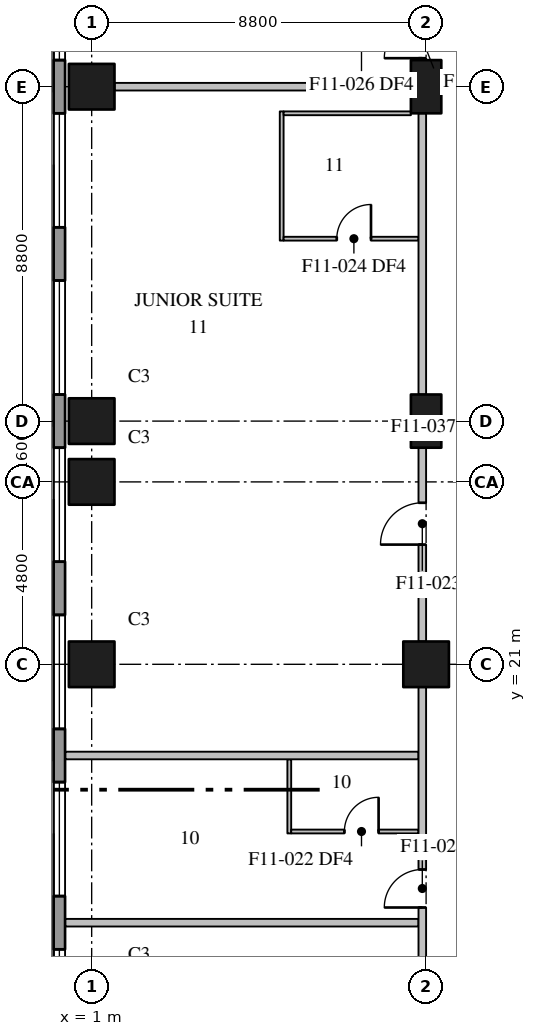
"""IFC4 building model, lengths in metres.
Left out: names, types, materials, properties, quantities, classifications, styles, units other than length and angle.
Written with IfcOpenShell. Run it as: python <this file> out.ifc"""

import sys

from ifc_helpers import new_model, si_unit, direction, frame, frame_2d, origin, origin_2d, place, context, subcontext, project, spatial, rectangle, extrude, element, fill, save


model = new_model("IFC4")
c1 = context("Model", 3, precision=1e-05, world=origin(), true_north=direction((0.0, 1.0)))
c2 = subcontext(c1, "Body", "Model", "MODEL_VIEW")
j1 = project(units=[si_unit("LENGTHUNIT", "METRE"), si_unit("PLANEANGLEUNIT", "RADIAN")], contexts=[c1])
p1 = place(None, origin())
s1 = spatial("IfcSite", under=j1, at=p1, CompositionType="ELEMENT")
p2 = place(p1, origin())
s2 = spatial("IfcBuilding", under=s1, at=p2, CompositionType="ELEMENT")
p3 = place(p2, frame((0.0, 0.0, 111.1)))
s3 = spatial("IfcBuildingStorey", under=s2, at=p3, CompositionType="ELEMENT", Elevation=111.1)
for number, where, z_axis, x_axis in (
    (1, (1.0, 21.0, 0.0), (0.0, 0.0, 1.0), (1.0, 0.0, 0.0)),
    (2, (1.0, 25.8, 0.0), (0.0, 0.0, 1.0), (1.0, 0.0, 0.0)),
    (3, (1.0, 27.4, 0.0), (0.0, 0.0, 1.0), (1.0, 0.0, 0.0)),
    (4, (1.0, 36.2, 0.0), (0.0, 0.0, 1.0), (1.0, 0.0, 0.0)),
    (5, (9.8, 21.0, 0.0), (0.0, 0.0, 1.0), (1.0, 0.0, 0.0)),
):
    element("IfcColumn", number, at=place(p3, frame(where, z_axis=z_axis, x_axis=x_axis)), inside=s3, PredefinedType="COLUMN", context=c2, shape_type="SweptSolid", body=[
        extrude(rectangle(XDim=1.2, YDim=1.2, at=origin_2d()), origin(), (0.0, 0.0, 1.0), 3.7),
    ])
for number, where, z_axis, x_axis in (
    (6, (9.8, 27.4, 0.0), (0.0, 0.0, 1.0), (0.0, 1.0, 0.0)),
    (7, (9.8, 36.2, 0.0), (0.0, 0.0, 1.0), (0.0, 1.0, 0.0)),
):
    element("IfcColumn", number, at=place(p3, frame(where, z_axis=z_axis, x_axis=x_axis)), inside=s3, PredefinedType="COLUMN", context=c2, shape_type="SweptSolid", body=[
        extrude(rectangle(XDim=1.4, YDim=0.8, at=origin_2d()), origin(), (0.0, 0.0, 1.0), 3.7),
    ])
p4 = place(p3, frame((0.15, 78.7, 0.0), z_axis=(0.0, 0.0, 1.0), x_axis=(0.0, -1.0, 0.0)))
e8 = element("IfcWall", 8, at=p4, inside=s3, PredefinedType="STANDARD", context=c2, shape_type="SweptSolid", body=[
    extrude(rectangle(XDim=76.5, YDim=0.3, at=frame_2d((38.25, 0.0))), origin(), (0.0, 0.0, 1.0), 3.4),
])
p5 = place(p4, frame((3.6, 0.0, 0.75)))
e9 = element("IfcOpeningElement", 9, at=p5, cuts=e8, PredefinedType="OPENING", context=c2, shape_type="SweptSolid", body=[
    extrude(rectangle(XDim=3.0, YDim=2.3, at=frame_2d((1.5, 1.15))), frame((0.0, 0.16, 0.0), z_axis=(0.0, -1.0, 0.0), x_axis=(1.0, 0.0, 0.0)), (0.0, 0.0, 1.0), 0.32),
])
p6 = place(p4, frame((8.0, 0.0, 0.75)))
e10 = element("IfcOpeningElement", 10, at=p6, cuts=e8, PredefinedType="OPENING", context=c2, shape_type="SweptSolid", body=[
    extrude(rectangle(XDim=3.0, YDim=2.3, at=frame_2d((1.5, 1.15))), frame((0.0, 0.16, 0.0), z_axis=(0.0, -1.0, 0.0), x_axis=(1.0, 0.0, 0.0)), (0.0, 0.0, 1.0), 0.32),
])
p7 = place(p4, frame((12.4, 0.0, 0.75)))
e11 = element("IfcOpeningElement", 11, at=p7, cuts=e8, PredefinedType="OPENING", context=c2, shape_type="SweptSolid", body=[
    extrude(rectangle(XDim=3.0, YDim=2.3, at=frame_2d((1.5, 1.15))), frame((0.0, 0.16, 0.0), z_axis=(0.0, -1.0, 0.0), x_axis=(1.0, 0.0, 0.0)), (0.0, 0.0, 1.0), 0.32),
])
p8 = place(p4, frame((16.8, 0.0, 0.75)))
e12 = element("IfcOpeningElement", 12, at=p8, cuts=e8, PredefinedType="OPENING", context=c2, shape_type="SweptSolid", body=[
    extrude(rectangle(XDim=3.0, YDim=2.3, at=frame_2d((1.5, 1.15))), frame((0.0, 0.16, 0.0), z_axis=(0.0, -1.0, 0.0), x_axis=(1.0, 0.0, 0.0)), (0.0, 0.0, 1.0), 0.32),
])
p9 = place(p4, frame((21.2, 0.0, 0.75)))
e13 = element("IfcOpeningElement", 13, at=p9, cuts=e8, PredefinedType="OPENING", context=c2, shape_type="SweptSolid", body=[
    extrude(rectangle(XDim=3.0, YDim=2.3, at=frame_2d((1.5, 1.15))), frame((0.0, 0.16, 0.0), z_axis=(0.0, -1.0, 0.0), x_axis=(1.0, 0.0, 0.0)), (0.0, 0.0, 1.0), 0.32),
])
p10 = place(p4, frame((25.6, 0.0, 0.75)))
e14 = element("IfcOpeningElement", 14, at=p10, cuts=e8, PredefinedType="OPENING", context=c2, shape_type="SweptSolid", body=[
    extrude(rectangle(XDim=3.0, YDim=2.3, at=frame_2d((1.5, 1.15))), frame((0.0, 0.16, 0.0), z_axis=(0.0, -1.0, 0.0), x_axis=(1.0, 0.0, 0.0)), (0.0, 0.0, 1.0), 0.32),
])
p11 = place(p4, frame((30.0, 0.0, 0.75)))
e15 = element("IfcOpeningElement", 15, at=p11, cuts=e8, PredefinedType="OPENING", context=c2, shape_type="SweptSolid", body=[
    extrude(rectangle(XDim=3.0, YDim=2.3, at=frame_2d((1.5, 1.15))), frame((0.0, 0.16, 0.0), z_axis=(0.0, -1.0, 0.0), x_axis=(1.0, 0.0, 0.0)), (0.0, 0.0, 1.0), 0.32),
])
p12 = place(p4, frame((34.4, 0.0, 0.75)))
e16 = element("IfcOpeningElement", 16, at=p12, cuts=e8, PredefinedType="OPENING", context=c2, shape_type="SweptSolid", body=[
    extrude(rectangle(XDim=3.0, YDim=2.3, at=frame_2d((1.5, 1.15))), frame((0.0, 0.16, 0.0), z_axis=(0.0, -1.0, 0.0), x_axis=(1.0, 0.0, 0.0)), (0.0, 0.0, 1.0), 0.32),
])
p13 = place(p4, frame((38.8, 0.0, 0.75)))
e17 = element("IfcOpeningElement", 17, at=p13, cuts=e8, PredefinedType="OPENING", context=c2, shape_type="SweptSolid", body=[
    extrude(rectangle(XDim=3.0, YDim=2.3, at=frame_2d((1.5, 1.15))), frame((0.0, 0.16, 0.0), z_axis=(0.0, -1.0, 0.0), x_axis=(1.0, 0.0, 0.0)), (0.0, 0.0, 1.0), 0.32),
])
p14 = place(p4, frame((43.2, 0.0, 0.75)))
e18 = element("IfcOpeningElement", 18, at=p14, cuts=e8, PredefinedType="OPENING", context=c2, shape_type="SweptSolid", body=[
    extrude(rectangle(XDim=3.0, YDim=2.3, at=frame_2d((1.5, 1.15))), frame((0.0, 0.16, 0.0), z_axis=(0.0, -1.0, 0.0), x_axis=(1.0, 0.0, 0.0)), (0.0, 0.0, 1.0), 0.32),
])
p15 = place(p4, frame((47.6, 0.0, 0.75)))
e19 = element("IfcOpeningElement", 19, at=p15, cuts=e8, PredefinedType="OPENING", context=c2, shape_type="SweptSolid", body=[
    extrude(rectangle(XDim=3.0, YDim=2.3, at=frame_2d((1.5, 1.15))), frame((0.0, 0.16, 0.0), z_axis=(0.0, -1.0, 0.0), x_axis=(1.0, 0.0, 0.0)), (0.0, 0.0, 1.0), 0.32),
])
p16 = place(p4, frame((52.0, 0.0, 0.75)))
e20 = element("IfcOpeningElement", 20, at=p16, cuts=e8, PredefinedType="OPENING", context=c2, shape_type="SweptSolid", body=[
    extrude(rectangle(XDim=3.0, YDim=2.3, at=frame_2d((1.5, 1.15))), frame((0.0, 0.16, 0.0), z_axis=(0.0, -1.0, 0.0), x_axis=(1.0, 0.0, 0.0)), (0.0, 0.0, 1.0), 0.32),
])
p17 = place(p4, frame((56.4, 0.0, 0.75)))
e21 = element("IfcOpeningElement", 21, at=p17, cuts=e8, PredefinedType="OPENING", context=c2, shape_type="SweptSolid", body=[
    extrude(rectangle(XDim=3.0, YDim=2.3, at=frame_2d((1.5, 1.15))), frame((0.0, 0.16, 0.0), z_axis=(0.0, -1.0, 0.0), x_axis=(1.0, 0.0, 0.0)), (0.0, 0.0, 1.0), 0.32),
])
p18 = place(p4, frame((60.8, 0.0, 0.75)))
e22 = element("IfcOpeningElement", 22, at=p18, cuts=e8, PredefinedType="OPENING", context=c2, shape_type="SweptSolid", body=[
    extrude(rectangle(XDim=3.0, YDim=2.3, at=frame_2d((1.5, 1.15))), frame((0.0, 0.16, 0.0), z_axis=(0.0, -1.0, 0.0), x_axis=(1.0, 0.0, 0.0)), (0.0, 0.0, 1.0), 0.32),
])
p19 = place(p4, frame((65.2, 0.0, 0.75)))
e23 = element("IfcOpeningElement", 23, at=p19, cuts=e8, PredefinedType="OPENING", context=c2, shape_type="SweptSolid", body=[
    extrude(rectangle(XDim=3.0, YDim=2.3, at=frame_2d((1.5, 1.15))), frame((0.0, 0.16, 0.0), z_axis=(0.0, -1.0, 0.0), x_axis=(1.0, 0.0, 0.0)), (0.0, 0.0, 1.0), 0.32),
])
p20 = place(p4, frame((69.6, 0.0, 0.75)))
e24 = element("IfcOpeningElement", 24, at=p20, cuts=e8, PredefinedType="OPENING", context=c2, shape_type="SweptSolid", body=[
    extrude(rectangle(XDim=3.0, YDim=2.3, at=frame_2d((1.5, 1.15))), frame((0.0, 0.16, 0.0), z_axis=(0.0, -1.0, 0.0), x_axis=(1.0, 0.0, 0.0)), (0.0, 0.0, 1.0), 0.32),
])
p21 = place(p3, frame((9.7, 12.9, 0.0), z_axis=(0.0, 0.0, 1.0), x_axis=(0.0, 1.0, 0.0)))
e25 = element("IfcWall", 25, at=p21, inside=s3, PredefinedType="PARTITIONING", context=c2, shape_type="SweptSolid", body=[
    extrude(rectangle(XDim=7.5, YDim=0.2, at=frame_2d((3.75, 0.0))), origin(), (0.0, 0.0, 1.0), 3.4),
])
p22 = place(p21, frame((1.7, 0.0, 0.0)))
e26 = element("IfcOpeningElement", 26, at=p22, cuts=e25, PredefinedType="OPENING", context=c2, shape_type="SweptSolid", body=[
    extrude(rectangle(XDim=1.0, YDim=2.1, at=frame_2d((0.5, 1.05))), frame((0.0, 0.11, 0.0), z_axis=(0.0, -1.0, 0.0), x_axis=(1.0, 0.0, 0.0)), (0.0, 0.0, 1.0), 0.22),
])
p23 = place(p3, frame((9.7, 21.6, 0.0), z_axis=(0.0, 0.0, 1.0), x_axis=(0.0, 1.0, 0.0)))
e27 = element("IfcWall", 27, at=p23, inside=s3, PredefinedType="PARTITIONING", context=c2, shape_type="SweptSolid", body=[
    extrude(rectangle(XDim=5.1, YDim=0.2, at=frame_2d((2.55, 0.0))), origin(), (0.0, 0.0, 1.0), 3.4),
])
p24 = place(p23, frame((2.55, 0.0, 0.0)))
e28 = element("IfcOpeningElement", 28, at=p24, cuts=e27, PredefinedType="OPENING", context=c2, shape_type="SweptSolid", body=[
    extrude(rectangle(XDim=1.1, YDim=2.1, at=frame_2d((0.55, 1.05))), frame((0.0, 0.11, 0.0), z_axis=(0.0, -1.0, 0.0), x_axis=(1.0, 0.0, 0.0)), (0.0, 0.0, 1.0), 0.22),
])
p25 = place(p3, frame((9.7, 28.1, 0.0), z_axis=(0.0, 0.0, 1.0), x_axis=(0.0, 1.0, 0.0)))
e29 = element("IfcWall", 29, at=p25, inside=s3, PredefinedType="PARTITIONING", context=c2, shape_type="SweptSolid", body=[
    extrude(rectangle(XDim=7.4, YDim=0.2, at=frame_2d((3.7, 0.0))), origin(), (0.0, 0.0, 1.0), 3.4),
])
p26 = place(p3, frame((9.7, 36.9, 0.0), z_axis=(0.0, 0.0, 1.0), x_axis=(0.0, 1.0, 0.0)))
e30 = element("IfcWall", 30, at=p26, inside=s3, PredefinedType="PARTITIONING", context=c2, shape_type="SweptSolid", body=[
    extrude(rectangle(XDim=7.4, YDim=0.2, at=frame_2d((3.7, 0.0))), origin(), (0.0, 0.0, 1.0), 3.4),
])
p27 = place(p26, frame((0.05, 0.0, 0.0)))
e31 = element("IfcOpeningElement", 31, at=p27, cuts=e30, PredefinedType="OPENING", context=c2, shape_type="SweptSolid", body=[
    extrude(rectangle(XDim=1.0, YDim=2.1, at=frame_2d((0.5, 1.05))), frame((0.0, 0.11, 0.0), z_axis=(0.0, -1.0, 0.0), x_axis=(1.0, 0.0, 0.0)), (0.0, 0.0, 1.0), 0.22),
])
for number, where, z_axis, x_axis in (
    (32, (0.31, 14.2, 0.0), (0.0, 0.0, 1.0), (1.0, 0.0, 0.0)),
    (33, (0.31, 18.6, 0.0), (0.0, 0.0, 1.0), (1.0, 0.0, 0.0)),
):
    element("IfcWall", number, at=place(p3, frame(where, z_axis=z_axis, x_axis=x_axis)), inside=s3, PredefinedType="PARTITIONING", context=c2, shape_type="SweptSolid", body=[
        extrude(rectangle(XDim=9.29, YDim=0.2, at=frame_2d((4.645, 0.0))), origin(), (0.0, 0.0, 1.0), 3.4),
    ])
p28 = place(p3, frame((1.6, 36.2, 0.0), z_axis=(0.0, 0.0, 1.0), x_axis=(1.0, 0.0, 0.0)))
e34 = element("IfcWall", 34, at=p28, inside=s3, PredefinedType="PARTITIONING", context=c2, shape_type="SweptSolid", body=[
    extrude(rectangle(XDim=7.8, YDim=0.2, at=frame_2d((3.9, 0.0))), origin(), (0.0, 0.0, 1.0), 3.4),
])
p29 = place(p3, frame((6.2, 16.55, 0.0), z_axis=(0.0, 0.0, 1.0), x_axis=(0.0, 1.0, 0.0)))
e35 = element("IfcWall", 35, at=p29, inside=s3, PredefinedType="PARTITIONING", context=c2, shape_type="SweptSolid", body=[
    extrude(rectangle(XDim=1.95, YDim=0.1, at=frame_2d((0.975, 0.0))), origin(), (0.0, 0.0, 1.0), 3.4),
])
p30 = place(p3, frame((6.25, 16.6, 0.0), z_axis=(0.0, 0.0, 1.0), x_axis=(1.0, 0.0, 0.0)))
e36 = element("IfcWall", 36, at=p30, inside=s3, PredefinedType="PARTITIONING", context=c2, shape_type="SweptSolid", body=[
    extrude(rectangle(XDim=3.35, YDim=0.1, at=frame_2d((1.675, 0.0))), origin(), (0.0, 0.0, 1.0), 3.4),
])
p31 = place(p30, frame((1.4, 0.0, 0.0)))
e37 = element("IfcOpeningElement", 37, at=p31, cuts=e36, PredefinedType="OPENING", context=c2, shape_type="SweptSolid", body=[
    extrude(rectangle(XDim=0.9, YDim=2.1, at=frame_2d((0.45, 1.05))), frame((0.0, 0.06, 0.0), z_axis=(0.0, -1.0, 0.0), x_axis=(1.0, 0.0, 0.0)), (0.0, 0.0, 1.0), 0.12),
])
p32 = place(p3, frame((6.0, 32.15, 0.0), z_axis=(0.0, 0.0, 1.0), x_axis=(0.0, 1.0, 0.0)))
e38 = element("IfcWall", 38, at=p32, inside=s3, PredefinedType="PARTITIONING", context=c2, shape_type="SweptSolid", body=[
    extrude(rectangle(XDim=3.4, YDim=0.1, at=frame_2d((1.7, 0.0))), origin(), (0.0, 0.0, 1.0), 3.4),
])
p33 = place(p3, frame((6.05, 32.2, 0.0), z_axis=(0.0, 0.0, 1.0), x_axis=(1.0, 0.0, 0.0)))
e39 = element("IfcWall", 39, at=p33, inside=s3, PredefinedType="PARTITIONING", context=c2, shape_type="SweptSolid", body=[
    extrude(rectangle(XDim=3.55, YDim=0.1, at=frame_2d((1.775, 0.0))), origin(), (0.0, 0.0, 1.0), 3.4),
])
p34 = place(p33, frame((1.4, 0.0, 0.0)))
e40 = element("IfcOpeningElement", 40, at=p34, cuts=e39, PredefinedType="OPENING", context=c2, shape_type="SweptSolid", body=[
    extrude(rectangle(XDim=0.9, YDim=2.1, at=frame_2d((0.45, 1.05))), frame((0.0, 0.06, 0.0), z_axis=(0.0, -1.0, 0.0), x_axis=(1.0, 0.0, 0.0)), (0.0, 0.0, 1.0), 0.12),
])
p35 = place(p3, frame((6.05, 35.5, 0.0), z_axis=(0.0, 0.0, 1.0), x_axis=(1.0, 0.0, 0.0)))
e41 = element("IfcWall", 41, at=p35, inside=s3, PredefinedType="PARTITIONING", context=c2, shape_type="SweptSolid", body=[
    extrude(rectangle(XDim=3.35, YDim=0.1, at=frame_2d((1.675, 0.0))), origin(), (0.0, 0.0, 1.0), 3.4),
])
p36 = place(p13, origin())
e42 = element("IfcWindow", 42, at=p36, inside=s3, PartitioningType="SINGLE_PANEL", PredefinedType="WINDOW", context=c2, shape_type="SweptSolid", body=[
    extrude(rectangle(XDim=3.0, YDim=2.3, at=frame_2d((1.5, 1.15))), frame((0.0, 0.03, 0.0), z_axis=(0.0, -1.0, 0.0), x_axis=(1.0, 0.0, 0.0)), (0.0, 0.0, 1.0), 0.06),
])
fill(e17, e42)
p37 = place(p14, origin())
e43 = element("IfcWindow", 43, at=p37, inside=s3, PartitioningType="SINGLE_PANEL", PredefinedType="WINDOW", context=c2, shape_type="SweptSolid", body=[
    extrude(rectangle(XDim=3.0, YDim=2.3, at=frame_2d((1.5, 1.15))), frame((0.0, 0.03, 0.0), z_axis=(0.0, -1.0, 0.0), x_axis=(1.0, 0.0, 0.0)), (0.0, 0.0, 1.0), 0.06),
])
fill(e18, e43)
p38 = place(p15, origin())
e44 = element("IfcWindow", 44, at=p38, inside=s3, PartitioningType="SINGLE_PANEL", PredefinedType="WINDOW", context=c2, shape_type="SweptSolid", body=[
    extrude(rectangle(XDim=3.0, YDim=2.3, at=frame_2d((1.5, 1.15))), frame((0.0, 0.03, 0.0), z_axis=(0.0, -1.0, 0.0), x_axis=(1.0, 0.0, 0.0)), (0.0, 0.0, 1.0), 0.06),
])
fill(e19, e44)
p39 = place(p16, origin())
e45 = element("IfcWindow", 45, at=p39, inside=s3, PartitioningType="SINGLE_PANEL", PredefinedType="WINDOW", context=c2, shape_type="SweptSolid", body=[
    extrude(rectangle(XDim=3.0, YDim=2.3, at=frame_2d((1.5, 1.15))), frame((0.0, 0.03, 0.0), z_axis=(0.0, -1.0, 0.0), x_axis=(1.0, 0.0, 0.0)), (0.0, 0.0, 1.0), 0.06),
])
fill(e20, e45)
p40 = place(p17, origin())
e46 = element("IfcWindow", 46, at=p40, inside=s3, PartitioningType="SINGLE_PANEL", PredefinedType="WINDOW", context=c2, shape_type="SweptSolid", body=[
    extrude(rectangle(XDim=3.0, YDim=2.3, at=frame_2d((1.5, 1.15))), frame((0.0, 0.03, 0.0), z_axis=(0.0, -1.0, 0.0), x_axis=(1.0, 0.0, 0.0)), (0.0, 0.0, 1.0), 0.06),
])
fill(e21, e46)
p41 = place(p18, origin())
e47 = element("IfcWindow", 47, at=p41, inside=s3, PartitioningType="SINGLE_PANEL", PredefinedType="WINDOW", context=c2, shape_type="SweptSolid", body=[
    extrude(rectangle(XDim=3.0, YDim=2.3, at=frame_2d((1.5, 1.15))), frame((0.0, 0.03, 0.0), z_axis=(0.0, -1.0, 0.0), x_axis=(1.0, 0.0, 0.0)), (0.0, 0.0, 1.0), 0.06),
])
fill(e22, e47)
p42 = place(p19, origin())
e48 = element("IfcWindow", 48, at=p42, inside=s3, PartitioningType="SINGLE_PANEL", PredefinedType="WINDOW", context=c2, shape_type="SweptSolid", body=[
    extrude(rectangle(XDim=3.0, YDim=2.3, at=frame_2d((1.5, 1.15))), frame((0.0, 0.03, 0.0), z_axis=(0.0, -1.0, 0.0), x_axis=(1.0, 0.0, 0.0)), (0.0, 0.0, 1.0), 0.06),
])
fill(e23, e48)
p43 = place(p22, origin())
e49 = element("IfcDoor", 49, at=p43, inside=s3, OperationType="SINGLE_SWING_LEFT", PredefinedType="DOOR", context=c2, shape_type="SweptSolid", body=[
    extrude(rectangle(XDim=1.0, YDim=2.1, at=frame_2d((0.5, 1.05))), frame((0.0, 0.025, 0.0), z_axis=(0.0, -1.0, 0.0), x_axis=(1.0, 0.0, 0.0)), (0.0, 0.0, 1.0), 0.05),
])
fill(e26, e49)
p44 = place(p31, origin())
e50 = element("IfcDoor", 50, at=p44, inside=s3, OperationType="SINGLE_SWING_RIGHT", PredefinedType="DOOR", context=c2, shape_type="SweptSolid", body=[
    extrude(rectangle(XDim=0.9, YDim=2.1, at=frame_2d((0.45, 1.05))), frame((0.0, 0.025, 0.0), z_axis=(0.0, -1.0, 0.0), x_axis=(1.0, 0.0, 0.0)), (0.0, 0.0, 1.0), 0.05),
])
fill(e37, e50)
p45 = place(p24, origin())
e51 = element("IfcDoor", 51, at=p45, inside=s3, OperationType="SINGLE_SWING_LEFT", PredefinedType="DOOR", context=c2, shape_type="SweptSolid", body=[
    extrude(rectangle(XDim=1.1, YDim=2.1, at=frame_2d((0.55, 1.05))), frame((0.0, 0.025, 0.0), z_axis=(0.0, -1.0, 0.0), x_axis=(1.0, 0.0, 0.0)), (0.0, 0.0, 1.0), 0.05),
])
fill(e28, e51)
p46 = place(p34, origin())
e52 = element("IfcDoor", 52, at=p46, inside=s3, OperationType="SINGLE_SWING_RIGHT", PredefinedType="DOOR", context=c2, shape_type="SweptSolid", body=[
    extrude(rectangle(XDim=0.9, YDim=2.1, at=frame_2d((0.45, 1.05))), frame((0.0, 0.025, 0.0), z_axis=(0.0, -1.0, 0.0), x_axis=(1.0, 0.0, 0.0)), (0.0, 0.0, 1.0), 0.05),
])
fill(e40, e52)
p47 = place(p27, origin())
e53 = element("IfcDoor", 53, at=p47, inside=s3, OperationType="SINGLE_SWING_LEFT", PredefinedType="DOOR", context=c2, shape_type="SweptSolid", body=[
    extrude(rectangle(XDim=1.0, YDim=2.1, at=frame_2d((0.5, 1.05))), frame((0.0, 0.025, 0.0), z_axis=(0.0, -1.0, 0.0), x_axis=(1.0, 0.0, 0.0)), (0.0, 0.0, 1.0), 0.05),
])
fill(e31, e53)
save(model, sys.argv[1])
